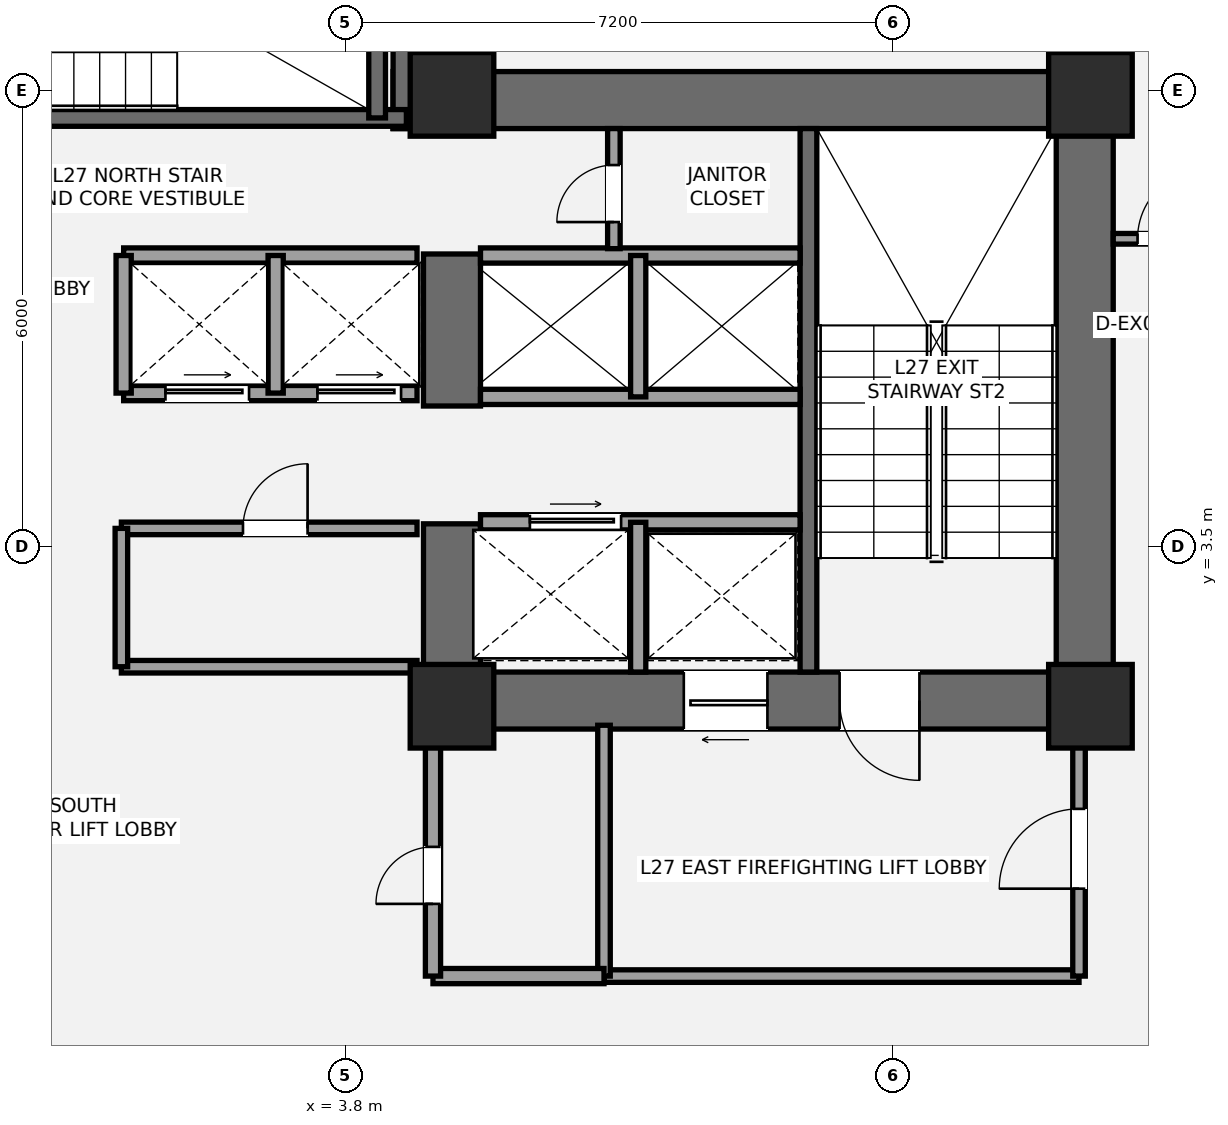
"""IFC4 building model, lengths in metres.
Left out: names, types, materials, properties, quantities, classifications, styles, units other than length and angle.
Written with IfcOpenShell. Run it as: python <this file> out.ifc"""

import sys

from ifc_helpers import new_model, si_unit, direction, frame, frame_2d, origin, origin_2d, place, context, subcontext, project, spatial, rectangle, extrude, element, fill, save


model = new_model("IFC4")
c1 = context("Model", 3, precision=1e-05, world=origin(), true_north=direction((0.0, 1.0)))
c2 = subcontext(c1, "Body", "Model", "MODEL_VIEW")
j1 = project(units=[si_unit("LENGTHUNIT", "METRE"), si_unit("PLANEANGLEUNIT", "RADIAN")], contexts=[c1])
p1 = place(None, origin())
s1 = spatial("IfcSite", under=j1, at=p1, CompositionType="ELEMENT")
p2 = place(p1, origin())
s2 = spatial("IfcBuilding", under=s1, at=p2, CompositionType="ELEMENT")
p3 = place(p2, frame((0.0, 0.0, 103.6)))
s3 = spatial("IfcBuildingStorey", under=s2, at=p3, CompositionType="ELEMENT", Elevation=103.6)
p4 = place(p3, frame((13.525, 1.1, 0.0), z_axis=(0.0, 0.0, 1.0), x_axis=(0.0, 1.0, 0.0)))
e1 = element("IfcWall", 1, at=p4, inside=s3, PredefinedType="SHEAR", context=c2, shape_type="SweptSolid", body=[
    extrude(rectangle(XDim=8.65, YDim=0.75, at=frame_2d((4.325, 0.0))), origin(), (0.0, 0.0, 1.0), 3.5),
])
p5 = place(p3, frame((4.425, 9.375, 0.0), z_axis=(0.0, 0.0, 1.0), x_axis=(1.0, 0.0, 0.0)))
e2 = element("IfcWall", 2, at=p5, inside=s3, PredefinedType="SHEAR", context=c2, shape_type="SweptSolid", body=[
    extrude(rectangle(XDim=9.475, YDim=0.75, at=frame_2d((4.737, 0.0))), origin(), (0.0, 0.0, 1.0), 3.5),
])
p6 = place(p3, frame((13.9, 1.475, 0.0), z_axis=(0.0, 0.0, 1.0), x_axis=(-1.0, 0.0, 0.0)))
e3 = element("IfcWall", 3, at=p6, inside=s3, PredefinedType="SHEAR", context=c2, shape_type="SweptSolid", body=[
    extrude(rectangle(XDim=9.075, YDim=0.75, at=frame_2d((4.538, 0.0))), origin(), (0.0, 0.0, 1.0), 3.5),
])
p7 = place(p6, frame((2.55, 0.0, 0.0)))
e4 = element("IfcOpeningElement", 4, at=p7, cuts=e3, PredefinedType="OPENING", context=c2, shape_type="SweptSolid", body=[
    extrude(rectangle(XDim=1.05, YDim=2.15, at=frame_2d((0.525, 1.075))), frame((0.0, 0.385, 0.0), z_axis=(0.0, -1.0, 0.0), x_axis=(1.0, 0.0, 0.0)), (0.0, 0.0, 1.0), 0.77),
])
p8 = place(p6, frame((4.55, 0.0, 0.0)))
e5 = element("IfcOpeningElement", 5, at=p8, cuts=e3, PredefinedType="OPENING", context=c2, shape_type="SweptSolid", body=[
    extrude(rectangle(XDim=1.1, YDim=2.2, at=frame_2d((0.55, 1.1))), frame((0.0, 0.385, 0.0), z_axis=(0.0, -1.0, 0.0), x_axis=(1.0, 0.0, 0.0)), (0.0, 0.0, 1.0), 0.77),
])
p9 = place(p3, frame((5.2, 1.1, 0.0), z_axis=(0.0, 0.0, 1.0), x_axis=(0.0, 1.0, 0.0)))
e6 = element("IfcWall", 6, at=p9, inside=s3, PredefinedType="SHEAR", context=c2, shape_type="SweptSolid", body=[
    extrude(rectangle(XDim=2.7, YDim=0.75, at=frame_2d((1.35, 0.0))), origin(), (0.0, 0.0, 1.0), 3.5),
])
p10 = place(p3, frame((5.2, 5.35, 0.0), z_axis=(0.0, 0.0, 1.0), x_axis=(0.0, 1.0, 0.0)))
e7 = element("IfcWall", 7, at=p10, inside=s3, PredefinedType="SHEAR", context=c2, shape_type="SweptSolid", body=[
    extrude(rectangle(XDim=2.0, YDim=0.75, at=frame_2d((1.0, 0.0))), origin(), (0.0, 0.0, 1.0), 3.5),
])
p11 = place(p3, frame((9.89, 1.85, 0.0), z_axis=(0.0, 0.0, 1.0), x_axis=(0.0, 1.0, 0.0)))
e8 = element("IfcWall", 8, at=p11, inside=s3, PredefinedType="SHEAR", context=c2, shape_type="SweptSolid", body=[
    extrude(rectangle(XDim=7.15, YDim=0.22, at=frame_2d((3.575, 0.0))), origin(), (0.0, 0.0, 1.0), 3.5),
])
p12 = place(p3, frame((4.8, 9.0, 0.0), z_axis=(0.0, 0.0, 1.0), x_axis=(0.0, 1.0, 0.0)))
e9 = element("IfcWall", 9, at=p12, inside=s3, PredefinedType="SHEAR", context=c2, shape_type="SweptSolid", body=[
    extrude(rectangle(XDim=4.15, YDim=0.75, at=frame_2d((2.075, 0.0))), origin(), (0.0, 0.0, 1.0), 3.5),
])
p13 = place(p3, frame((-4.7, 9.14, 0.0), z_axis=(0.0, 0.0, 1.0), x_axis=(1.0, 0.0, 0.0)))
e10 = element("IfcWall", 10, at=p13, inside=s3, PredefinedType="SHEAR", context=c2, shape_type="SweptSolid", body=[
    extrude(rectangle(XDim=9.3, YDim=0.22, at=frame_2d((4.65, 0.0))), origin(), (0.0, 0.0, 1.0), 3.5),
])
p14 = place(p13, frame((1.15, 0.0, 0.0)))
e11 = element("IfcOpeningElement", 11, at=p14, cuts=e10, PredefinedType="OPENING", context=c2, shape_type="SweptSolid", body=[
    extrude(rectangle(XDim=1.05, YDim=2.15, at=frame_2d((0.525, 1.075))), frame((0.0, 0.12, 0.0), z_axis=(0.0, -1.0, 0.0), x_axis=(1.0, 0.0, 0.0)), (0.0, 0.0, 1.0), 0.24),
])
p15 = place(p3, frame((4.215, 9.14, 0.0), z_axis=(0.0, 0.0, 1.0), x_axis=(0.0, 1.0, 0.0)))
e12 = element("IfcWall", 12, at=p15, inside=s3, PredefinedType="SHEAR", context=c2, shape_type="SweptSolid", body=[
    extrude(rectangle(XDim=3.26, YDim=0.22, at=frame_2d((1.63, 0.0))), origin(), (0.0, 0.0, 1.0), 3.5),
])
for number, where, z_axis, x_axis in (
    (13, (5.2, 1.4, 0.0), (0.0, 0.0, 1.0), (1.0, 0.0, 0.0)),
    (14, (5.2, 9.45, 0.0), (0.0, 0.0, 1.0), (1.0, 0.0, 0.0)),
    (15, (13.6, 1.4, 0.0), (0.0, 0.0, 1.0), (1.0, 0.0, 0.0)),
    (16, (13.6, 9.45, 0.0), (0.0, 0.0, 1.0), (1.0, 0.0, 0.0)),
):
    element("IfcColumn", number, at=place(p3, frame(where, z_axis=z_axis, x_axis=x_axis)), inside=s3, PredefinedType="COLUMN", context=c2, shape_type="SweptSolid", body=[
        extrude(rectangle(XDim=1.1, YDim=1.1, at=origin_2d()), origin(), (0.0, 0.0, 1.0), 3.5),
    ])
p16 = place(p3, frame((7.2, -2.15, 0.0), z_axis=(0.0, 0.0, 1.0), x_axis=(1.0, 0.0, 0.0)))
e17 = element("IfcWall", 17, at=p16, inside=s3, PredefinedType="PARTITIONING", context=c2, shape_type="SweptSolid", body=[
    extrude(rectangle(XDim=6.25, YDim=0.165, at=frame_2d((3.125, 0.0))), origin(), (0.0, 0.0, 1.0), 3.31),
])
p17 = place(p3, frame((7.2, -2.15, 0.0), z_axis=(0.0, 0.0, 1.0), x_axis=(0.0, 1.0, 0.0)))
e18 = element("IfcWall", 18, at=p17, inside=s3, PredefinedType="PARTITIONING", context=c2, shape_type="SweptSolid", body=[
    extrude(rectangle(XDim=3.3, YDim=0.165, at=frame_2d((1.65, 0.0))), origin(), (0.0, 0.0, 1.0), 3.31),
])
p18 = place(p3, frame((13.45, -2.15, 0.0), z_axis=(0.0, 0.0, 1.0), x_axis=(0.0, 1.0, 0.0)))
e19 = element("IfcWall", 19, at=p18, inside=s3, PredefinedType="PARTITIONING", context=c2, shape_type="SweptSolid", body=[
    extrude(rectangle(XDim=3.3, YDim=0.165, at=frame_2d((1.65, 0.0))), origin(), (0.0, 0.0, 1.0), 2.763),
])
p19 = place(p18, frame((1.15, 0.0, 0.0)))
e20 = element("IfcOpeningElement", 20, at=p19, cuts=e19, PredefinedType="OPENING", context=c2, shape_type="SweptSolid", body=[
    extrude(rectangle(XDim=1.05, YDim=2.15, at=frame_2d((0.525, 1.075))), frame((0.0, 0.093, 0.0), z_axis=(0.0, -1.0, 0.0), x_axis=(1.0, 0.0, 0.0)), (0.0, 0.0, 1.0), 0.185),
])
p20 = place(p3, frame((4.95, -2.15, 0.0), z_axis=(0.0, 0.0, 1.0), x_axis=(1.0, 0.0, 0.0)))
e21 = element("IfcWall", 21, at=p20, inside=s3, PredefinedType="SOLIDWALL", context=c2, shape_type="SweptSolid", body=[
    extrude(rectangle(XDim=2.25, YDim=0.2, at=frame_2d((1.125, 0.0))), origin(), (0.0, 0.0, 1.0), 2.763),
])
p21 = place(p3, frame((4.95, -2.15, 0.0), z_axis=(0.0, 0.0, 1.0), x_axis=(0.0, 1.0, 0.0)))
e22 = element("IfcWall", 22, at=p21, inside=s3, PredefinedType="SOLIDWALL", context=c2, shape_type="SweptSolid", body=[
    extrude(rectangle(XDim=3.3, YDim=0.2, at=frame_2d((1.65, 0.0))), origin(), (0.0, 0.0, 1.0), 3.31),
])
p22 = place(p21, frame((0.95, 0.0, 0.0)))
e23 = element("IfcOpeningElement", 23, at=p22, cuts=e22, PredefinedType="OPENING", context=c2, shape_type="SweptSolid", body=[
    extrude(rectangle(XDim=0.75, YDim=2.1, at=frame_2d((0.375, 1.05))), frame((0.0, 0.11, 0.0), z_axis=(0.0, -1.0, 0.0), x_axis=(1.0, 0.0, 0.0)), (0.0, 0.0, 1.0), 0.22),
])
p23 = place(p3, frame((5.575, 3.82, 0.0), z_axis=(0.0, 0.0, 1.0), x_axis=(1.0, 0.0, 0.0)))
e24 = element("IfcWall", 24, at=p23, inside=s3, PredefinedType="SOLIDWALL", context=c2, shape_type="SweptSolid", body=[
    extrude(rectangle(XDim=4.205, YDim=0.2, at=frame_2d((2.103, 0.0))), origin(), (0.0, 0.0, 1.0), 3.31),
])
p24 = place(p23, frame((0.65, 0.0, 0.0)))
e25 = element("IfcOpeningElement", 25, at=p24, cuts=e24, PredefinedType="OPENING", context=c2, shape_type="SweptSolid", body=[
    extrude(rectangle(XDim=1.2, YDim=2.2, at=frame_2d((0.6, 1.1))), frame((0.0, 0.11, 0.0), z_axis=(0.0, -1.0, 0.0), x_axis=(1.0, 0.0, 0.0)), (0.0, 0.0, 1.0), 0.22),
])
p25 = place(p3, frame((7.65, 1.85, 0.0), z_axis=(0.0, 0.0, 1.0), x_axis=(0.0, 1.0, 0.0)))
e26 = element("IfcWall", 26, at=p25, inside=s3, PredefinedType="SOLIDWALL", context=c2, shape_type="SweptSolid", body=[
    extrude(rectangle(XDim=1.97, YDim=0.2, at=frame_2d((0.985, 0.0))), origin(), (0.0, 0.0, 1.0), 3.31),
])
for number, where, z_axis, x_axis in (
    (27, (5.575, 5.47, 0.0), (0.0, 0.0, 1.0), (1.0, 0.0, 0.0)),
    (28, (5.575, 7.33, 0.0), (0.0, 0.0, 1.0), (1.0, 0.0, 0.0)),
):
    element("IfcWall", number, at=place(p3, frame(where, z_axis=z_axis, x_axis=x_axis)), inside=s3, PredefinedType="SOLIDWALL", context=c2, shape_type="SweptSolid", body=[
        extrude(rectangle(XDim=4.205, YDim=0.2, at=frame_2d((2.103, 0.0))), origin(), (0.0, 0.0, 1.0), 3.31),
    ])
p26 = place(p3, frame((7.65, 5.47, 0.0), z_axis=(0.0, 0.0, 1.0), x_axis=(0.0, 1.0, 0.0)))
e29 = element("IfcWall", 29, at=p26, inside=s3, PredefinedType="SOLIDWALL", context=c2, shape_type="SweptSolid", body=[
    extrude(rectangle(XDim=1.86, YDim=0.2, at=frame_2d((0.93, 0.0))), origin(), (0.0, 0.0, 1.0), 3.31),
])
p27 = place(p3, frame((0.85, 1.92, 0.0), z_axis=(0.0, 0.0, 1.0), x_axis=(1.0, 0.0, 0.0)))
e30 = element("IfcWall", 30, at=p27, inside=s3, PredefinedType="PARTITIONING", context=c2, shape_type="SweptSolid", body=[
    extrude(rectangle(XDim=3.89, YDim=0.165, at=frame_2d((1.945, 0.0))), origin(), (0.0, 0.0, 1.0), 2.3),
])
p28 = place(p3, frame((0.85, 3.74, 0.0), z_axis=(0.0, 0.0, 1.0), x_axis=(1.0, 0.0, 0.0)))
e31 = element("IfcWall", 31, at=p28, inside=s3, PredefinedType="PARTITIONING", context=c2, shape_type="SweptSolid", body=[
    extrude(rectangle(XDim=3.89, YDim=0.165, at=frame_2d((1.945, 0.0))), origin(), (0.0, 0.0, 1.0), 3.31),
])
p29 = place(p28, frame((1.6, 0.0, 0.0)))
e32 = element("IfcOpeningElement", 32, at=p29, cuts=e31, PredefinedType="OPENING", context=c2, shape_type="SweptSolid", body=[
    extrude(rectangle(XDim=0.85, YDim=2.1, at=frame_2d((0.425, 1.05))), frame((0.0, 0.093, 0.0), z_axis=(0.0, -1.0, 0.0), x_axis=(1.0, 0.0, 0.0)), (0.0, 0.0, 1.0), 0.185),
])
p30 = place(p3, frame((0.85, 1.92, 0.0), z_axis=(0.0, 0.0, 1.0), x_axis=(0.0, 1.0, 0.0)))
e33 = element("IfcWall", 33, at=p30, inside=s3, PredefinedType="PARTITIONING", context=c2, shape_type="SweptSolid", body=[
    extrude(rectangle(XDim=1.82, YDim=0.165, at=frame_2d((0.91, 0.0))), origin(), (0.0, 0.0, 1.0), 3.31),
])
p31 = place(p3, frame((0.88, 5.52, 0.0), z_axis=(0.0, 0.0, 1.0), x_axis=(1.0, 0.0, 0.0)))
e34 = element("IfcWall", 34, at=p31, inside=s3, PredefinedType="SOLIDWALL", context=c2, shape_type="SweptSolid", body=[
    extrude(rectangle(XDim=3.86, YDim=0.2, at=frame_2d((1.93, 0.0))), origin(), (0.0, 0.0, 1.0), 3.31),
])
p32 = place(p31, frame((0.55, 0.0, 0.0)))
e35 = element("IfcOpeningElement", 35, at=p32, cuts=e34, PredefinedType="OPENING", context=c2, shape_type="SweptSolid", body=[
    extrude(rectangle(XDim=1.1, YDim=2.2, at=frame_2d((0.55, 1.1))), frame((0.0, 0.11, 0.0), z_axis=(0.0, -1.0, 0.0), x_axis=(1.0, 0.0, 0.0)), (0.0, 0.0, 1.0), 0.22),
])
p33 = place(p31, frame((2.55, 0.0, 0.0)))
e36 = element("IfcOpeningElement", 36, at=p33, cuts=e34, PredefinedType="OPENING", context=c2, shape_type="SweptSolid", body=[
    extrude(rectangle(XDim=1.1, YDim=2.2, at=frame_2d((0.55, 1.1))), frame((0.0, 0.11, 0.0), z_axis=(0.0, -1.0, 0.0), x_axis=(1.0, 0.0, 0.0)), (0.0, 0.0, 1.0), 0.22),
])
p34 = place(p3, frame((0.88, 7.33, 0.0), z_axis=(0.0, 0.0, 1.0), x_axis=(1.0, 0.0, 0.0)))
e37 = element("IfcWall", 37, at=p34, inside=s3, PredefinedType="SOLIDWALL", context=c2, shape_type="SweptSolid", body=[
    extrude(rectangle(XDim=3.86, YDim=0.2, at=frame_2d((1.93, 0.0))), origin(), (0.0, 0.0, 1.0), 3.31),
])
for number, where, z_axis, x_axis in (
    (38, (2.88, 5.52, 0.0), (0.0, 0.0, 1.0), (0.0, 1.0, 0.0)),
    (39, (0.88, 5.52, 0.0), (0.0, 0.0, 1.0), (0.0, 1.0, 0.0)),
):
    element("IfcWall", number, at=place(p3, frame(where, z_axis=z_axis, x_axis=x_axis)), inside=s3, PredefinedType="SOLIDWALL", context=c2, shape_type="SweptSolid", body=[
        extrude(rectangle(XDim=1.81, YDim=0.2, at=frame_2d((0.905, 0.0))), origin(), (0.0, 0.0, 1.0), 3.31),
    ])
p35 = place(p3, frame((7.33, 7.42, 0.0), z_axis=(0.0, 0.0, 1.0), x_axis=(0.0, 1.0, 0.0)))
e40 = element("IfcWall", 40, at=p35, inside=s3, PredefinedType="PARTITIONING", context=c2, shape_type="SweptSolid", body=[
    extrude(rectangle(XDim=1.58, YDim=0.165, at=frame_2d((0.79, 0.0))), origin(), (0.0, 0.0, 1.0), 3.31),
])
p36 = place(p35, frame((0.35, 0.0, 0.0)))
e41 = element("IfcOpeningElement", 41, at=p36, cuts=e40, PredefinedType="OPENING", context=c2, shape_type="SweptSolid", body=[
    extrude(rectangle(XDim=0.75, YDim=2.1, at=frame_2d((0.375, 1.05))), frame((0.0, 0.093, 0.0), z_axis=(0.0, -1.0, 0.0), x_axis=(1.0, 0.0, 0.0)), (0.0, 0.0, 1.0), 0.185),
])
p37 = place(p3, frame((13.9, 7.55, 0.0), z_axis=(0.0, 0.0, 1.0), x_axis=(1.0, 0.0, 0.0)))
e42 = element("IfcWall", 42, at=p37, inside=s3, PredefinedType="PARTITIONING", context=c2, shape_type="SweptSolid", body=[
    extrude(rectangle(XDim=1.8, YDim=0.14, at=frame_2d((0.9, 0.0))), origin(), (0.0, 0.0, 1.0), 2.763),
])
p38 = place(p37, frame((0.32, 0.0, 0.0)))
e43 = element("IfcOpeningElement", 43, at=p38, cuts=e42, PredefinedType="OPENING", context=c2, shape_type="SweptSolid", body=[
    extrude(rectangle(XDim=0.92, YDim=2.15, at=frame_2d((0.46, 1.075))), frame((0.0, 0.08, 0.0), z_axis=(0.0, -1.0, 0.0), x_axis=(1.0, 0.0, 0.0)), (0.0, 0.0, 1.0), 0.16),
])
p39 = place(p7, origin())
e44 = element("IfcDoor", 44, at=p39, inside=s3, OperationType="SINGLE_SWING_LEFT", PredefinedType="DOOR", context=c2, shape_type="SweptSolid", body=[
    extrude(rectangle(XDim=1.05, YDim=2.15, at=frame_2d((0.525, 1.075))), frame((0.0, 0.025, 0.0), z_axis=(0.0, -1.0, 0.0), x_axis=(1.0, 0.0, 0.0)), (0.0, 0.0, 1.0), 0.05),
])
fill(e4, e44)
p40 = place(p19, origin())
e45 = element("IfcDoor", 45, at=p40, inside=s3, OperationType="SINGLE_SWING_LEFT", PredefinedType="DOOR", context=c2, shape_type="SweptSolid", body=[
    extrude(rectangle(XDim=1.05, YDim=2.15, at=frame_2d((0.525, 1.075))), frame((0.0, 0.025, 0.0), z_axis=(0.0, -1.0, 0.0), x_axis=(1.0, 0.0, 0.0)), (0.0, 0.0, 1.0), 0.05),
])
fill(e20, e45)
p41 = place(p22, origin())
e46 = element("IfcDoor", 46, at=p41, inside=s3, OperationType="SINGLE_SWING_LEFT", PredefinedType="DOOR", context=c2, shape_type="SweptSolid", body=[
    extrude(rectangle(XDim=0.75, YDim=2.1, at=frame_2d((0.375, 1.05))), frame((0.0, 0.025, 0.0), z_axis=(0.0, -1.0, 0.0), x_axis=(1.0, 0.0, 0.0)), (0.0, 0.0, 1.0), 0.05),
])
fill(e23, e46)
p42 = place(p8, origin())
e47 = element("IfcDoor", 47, at=p42, inside=s3, OperationType="SLIDING_TO_LEFT", PredefinedType="DOOR", context=c2, shape_type="SweptSolid", body=[
    extrude(rectangle(XDim=1.1, YDim=2.2, at=frame_2d((0.55, 1.1))), frame((0.0, 0.025, 0.0), z_axis=(0.0, -1.0, 0.0), x_axis=(1.0, 0.0, 0.0)), (0.0, 0.0, 1.0), 0.05),
])
fill(e5, e47)
p43 = place(p24, origin())
e48 = element("IfcDoor", 48, at=p43, inside=s3, OperationType="SLIDING_TO_RIGHT", PredefinedType="DOOR", context=c2, shape_type="SweptSolid", body=[
    extrude(rectangle(XDim=1.2, YDim=2.2, at=frame_2d((0.6, 1.1))), frame((0.0, 0.025, 0.0), z_axis=(0.0, -1.0, 0.0), x_axis=(1.0, 0.0, 0.0)), (0.0, 0.0, 1.0), 0.05),
])
fill(e25, e48)
p44 = place(p29, origin())
e49 = element("IfcDoor", 49, at=p44, inside=s3, OperationType="SINGLE_SWING_RIGHT", PredefinedType="DOOR", context=c2, shape_type="SweptSolid", body=[
    extrude(rectangle(XDim=0.85, YDim=2.1, at=frame_2d((0.425, 1.05))), frame((0.0, 0.025, 0.0), z_axis=(0.0, -1.0, 0.0), x_axis=(1.0, 0.0, 0.0)), (0.0, 0.0, 1.0), 0.05),
])
fill(e32, e49)
p45 = place(p32, origin())
e50 = element("IfcDoor", 50, at=p45, inside=s3, OperationType="SLIDING_TO_LEFT", PredefinedType="DOOR", context=c2, shape_type="SweptSolid", body=[
    extrude(rectangle(XDim=1.1, YDim=2.2, at=frame_2d((0.55, 1.1))), frame((0.0, 0.025, 0.0), z_axis=(0.0, -1.0, 0.0), x_axis=(1.0, 0.0, 0.0)), (0.0, 0.0, 1.0), 0.05),
])
fill(e35, e50)
p46 = place(p33, origin())
e51 = element("IfcDoor", 51, at=p46, inside=s3, OperationType="SLIDING_TO_LEFT", PredefinedType="DOOR", context=c2, shape_type="SweptSolid", body=[
    extrude(rectangle(XDim=1.1, YDim=2.2, at=frame_2d((0.55, 1.1))), frame((0.0, 0.025, 0.0), z_axis=(0.0, -1.0, 0.0), x_axis=(1.0, 0.0, 0.0)), (0.0, 0.0, 1.0), 0.05),
])
fill(e36, e51)
p47 = place(p36, origin())
e52 = element("IfcDoor", 52, at=p47, inside=s3, OperationType="SINGLE_SWING_LEFT", PredefinedType="DOOR", context=c2, shape_type="SweptSolid", body=[
    extrude(rectangle(XDim=0.75, YDim=2.1, at=frame_2d((0.375, 1.05))), frame((0.0, 0.025, 0.0), z_axis=(0.0, -1.0, 0.0), x_axis=(1.0, 0.0, 0.0)), (0.0, 0.0, 1.0), 0.05),
])
fill(e41, e52)
p48 = place(p38, origin())
e53 = element("IfcDoor", 53, at=p48, inside=s3, OperationType="SINGLE_SWING_RIGHT", PredefinedType="DOOR", context=c2, shape_type="SweptSolid", body=[
    extrude(rectangle(XDim=0.92, YDim=2.15, at=frame_2d((0.46, 1.075))), frame((0.0, 0.025, 0.0), z_axis=(0.0, -1.0, 0.0), x_axis=(1.0, 0.0, 0.0)), (0.0, 0.0, 1.0), 0.05),
])
fill(e43, e53)
save(model, sys.argv[1])
